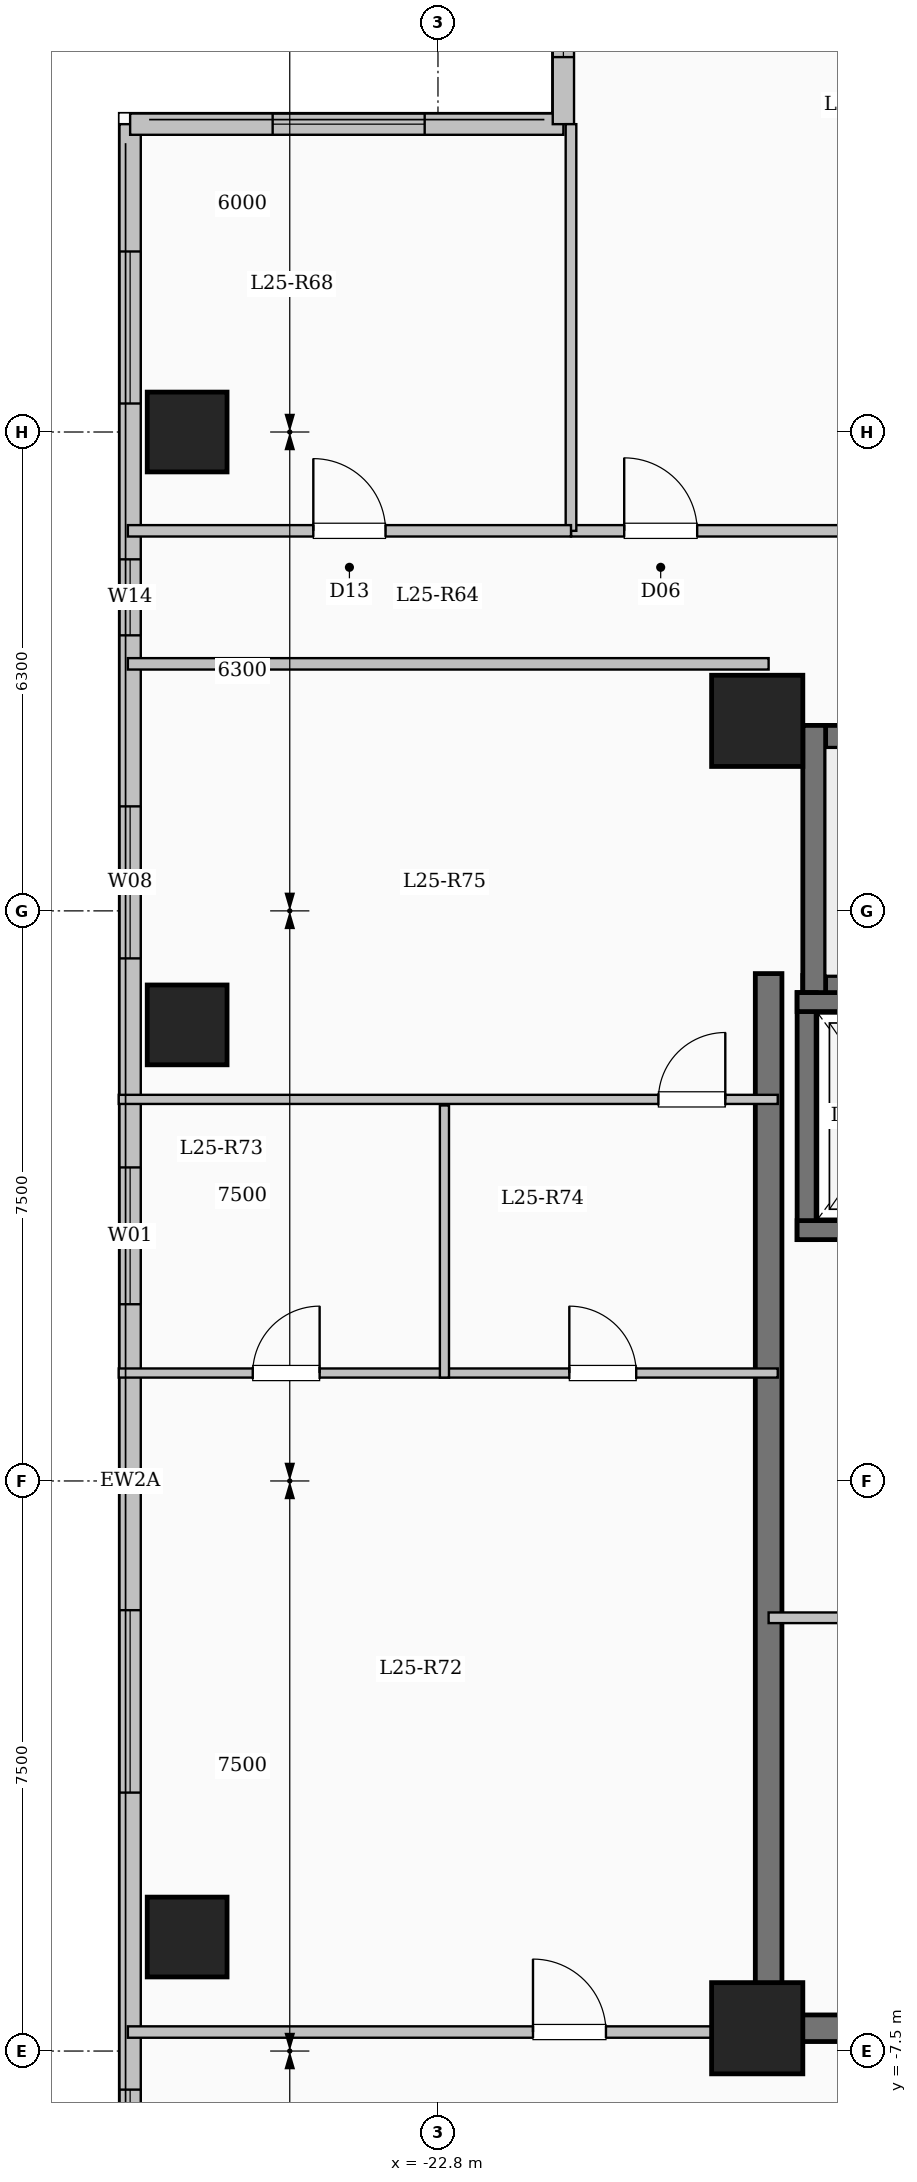
"""IFC4 building model, lengths in metres.
Left out: names, types, materials, properties, quantities, classifications, styles, units other than length and angle.
Written with IfcOpenShell. Run it as: python <this file> out.ifc"""

import sys

from ifc_helpers import new_model, si_unit, direction, frame, frame_2d, origin, origin_2d, place, context, subcontext, project, spatial, rectangle, extrude, element, fill, save


model = new_model("IFC4")
c1 = context("Model", 3, precision=1e-05, world=origin(), true_north=direction((0.0, 1.0)))
c2 = subcontext(c1, "Body", "Model", "MODEL_VIEW")
j1 = project(units=[si_unit("LENGTHUNIT", "METRE"), si_unit("PLANEANGLEUNIT", "RADIAN")], contexts=[c1])
p1 = place(None, origin())
s1 = spatial("IfcSite", under=j1, at=p1, CompositionType="ELEMENT")
p2 = place(p1, origin())
s2 = spatial("IfcBuilding", under=s1, at=p2, CompositionType="ELEMENT")
p3 = place(p2, frame((0.0, 0.0, 95.05)))
s3 = spatial("IfcBuildingStorey", under=s2, at=p3, CompositionType="ELEMENT", Elevation=95.05)
for number, where, z_axis, x_axis in (
    (1, (-18.6, -7.2, 0.0), (0.0, 0.0, 1.0), (1.0, 0.0, 0.0)),
    (2, (-18.6, 10.0, 0.0), (0.0, 0.0, 1.0), (1.0, 0.0, 0.0)),
):
    element("IfcColumn", number, at=place(p3, frame(where, z_axis=z_axis, x_axis=x_axis)), inside=s3, PredefinedType="COLUMN", context=c2, shape_type="SweptSolid", body=[
        extrude(rectangle(XDim=1.2, YDim=1.2, at=origin_2d()), origin(), (0.0, 0.0, 1.0), 3.35),
    ])
for number, where, z_axis, x_axis in (
    (3, (-26.1, -6.0, 0.0), (0.0, 0.0, 1.0), (1.0, 0.0, 0.0)),
    (4, (-26.1, 6.0, 0.0), (0.0, 0.0, 1.0), (1.0, 0.0, 0.0)),
    (5, (-26.1, 13.8, 0.0), (0.0, 0.0, 1.0), (1.0, 0.0, 0.0)),
):
    element("IfcColumn", number, at=place(p3, frame(where, z_axis=z_axis, x_axis=x_axis)), inside=s3, PredefinedType="COLUMN", context=c2, shape_type="SweptSolid", body=[
        extrude(rectangle(XDim=1.05, YDim=1.05, at=origin_2d()), origin(), (0.0, 0.0, 1.0), 3.35),
    ])
p4 = place(p3, frame((-26.85, -17.85, 0.0), z_axis=(0.0, 0.0, 1.0), x_axis=(0.0, 1.0, 0.0)))
e6 = element("IfcWall", 6, at=p4, inside=s3, PredefinedType="SOLIDWALL", context=c2, shape_type="SweptSolid", body=[
    extrude(rectangle(XDim=35.7, YDim=0.28, at=frame_2d((17.85, 0.0))), origin(), (0.0, 0.0, 1.0), 3.1),
])
p5 = place(p4, frame((2.55, 0.0, 0.9)))
e7 = element("IfcOpeningElement", 7, at=p5, cuts=e6, PredefinedType="OPENING", context=c2, shape_type="SweptSolid", body=[
    extrude(rectangle(XDim=2.4, YDim=1.8, at=frame_2d((1.2, 0.9))), frame((0.0, 0.15, 0.0), z_axis=(0.0, -1.0, 0.0), x_axis=(1.0, 0.0, 0.0)), (0.0, 0.0, 1.0), 0.3),
])
p6 = place(p4, frame((8.343, 0.0, 0.9)))
e8 = element("IfcOpeningElement", 8, at=p6, cuts=e6, PredefinedType="OPENING", context=c2, shape_type="SweptSolid", body=[
    extrude(rectangle(XDim=1.5, YDim=1.65, at=frame_2d((0.75, 0.825))), frame((0.0, 0.15, 0.0), z_axis=(0.0, -1.0, 0.0), x_axis=(1.0, 0.0, 0.0)), (0.0, 0.0, 1.0), 0.3),
])
p7 = place(p4, frame((13.75, 0.0, 0.9)))
e9 = element("IfcOpeningElement", 9, at=p7, cuts=e6, PredefinedType="OPENING", context=c2, shape_type="SweptSolid", body=[
    extrude(rectangle(XDim=2.4, YDim=1.8, at=frame_2d((1.2, 0.9))), frame((0.0, 0.15, 0.0), z_axis=(0.0, -1.0, 0.0), x_axis=(1.0, 0.0, 0.0)), (0.0, 0.0, 1.0), 0.3),
])
p8 = place(p4, frame((20.175, 0.0, 0.9)))
e10 = element("IfcOpeningElement", 10, at=p8, cuts=e6, PredefinedType="OPENING", context=c2, shape_type="SweptSolid", body=[
    extrude(rectangle(XDim=1.8, YDim=1.65, at=frame_2d((0.9, 0.825))), frame((0.0, 0.15, 0.0), z_axis=(0.0, -1.0, 0.0), x_axis=(1.0, 0.0, 0.0)), (0.0, 0.0, 1.0), 0.3),
])
p9 = place(p4, frame((24.725, 0.0, 0.9)))
e11 = element("IfcOpeningElement", 11, at=p9, cuts=e6, PredefinedType="OPENING", context=c2, shape_type="SweptSolid", body=[
    extrude(rectangle(XDim=2.0, YDim=1.7, at=frame_2d((1.0, 0.85))), frame((0.0, 0.15, 0.0), z_axis=(0.0, -1.0, 0.0), x_axis=(1.0, 0.0, 0.0)), (0.0, 0.0, 1.0), 0.3),
])
p10 = place(p4, frame((28.975, 0.0, 0.95)))
e12 = element("IfcOpeningElement", 12, at=p10, cuts=e6, PredefinedType="OPENING", context=c2, shape_type="SweptSolid", body=[
    extrude(rectangle(XDim=1.0, YDim=1.5, at=frame_2d((0.5, 0.75))), frame((0.0, 0.15, 0.0), z_axis=(0.0, -1.0, 0.0), x_axis=(1.0, 0.0, 0.0)), (0.0, 0.0, 1.0), 0.3),
])
p11 = place(p4, frame((32.025, 0.0, 0.9)))
e13 = element("IfcOpeningElement", 13, at=p11, cuts=e6, PredefinedType="OPENING", context=c2, shape_type="SweptSolid", body=[
    extrude(rectangle(XDim=2.0, YDim=1.7, at=frame_2d((1.0, 0.85))), frame((0.0, 0.15, 0.0), z_axis=(0.0, -1.0, 0.0), x_axis=(1.0, 0.0, 0.0)), (0.0, 0.0, 1.0), 0.3),
])
p12 = place(p3, frame((-26.85, 17.85, 0.0), z_axis=(0.0, 0.0, 1.0), x_axis=(1.0, 0.0, 0.0)))
e14 = element("IfcWall", 14, at=p12, inside=s3, PredefinedType="SOLIDWALL", context=c2, shape_type="SweptSolid", body=[
    extrude(rectangle(XDim=5.7, YDim=0.28, at=frame_2d((2.85, 0.0))), origin(), (0.0, 0.0, 1.0), 3.1),
])
p13 = place(p12, frame((1.875, 0.0, 0.9)))
e15 = element("IfcOpeningElement", 15, at=p13, cuts=e14, PredefinedType="OPENING", context=c2, shape_type="SweptSolid", body=[
    extrude(rectangle(XDim=2.0, YDim=1.7, at=frame_2d((1.0, 0.85))), frame((0.0, 0.15, 0.0), z_axis=(0.0, -1.0, 0.0), x_axis=(1.0, 0.0, 0.0)), (0.0, 0.0, 1.0), 0.3),
])
p14 = place(p3, frame((-21.15, 17.85, 0.0), z_axis=(0.0, 0.0, 1.0), x_axis=(0.0, 1.0, 0.0)))
e16 = element("IfcWall", 16, at=p14, inside=s3, PredefinedType="SOLIDWALL", context=c2, shape_type="SweptSolid", body=[
    extrude(rectangle(XDim=4.2, YDim=0.28, at=frame_2d((2.1, 0.0))), origin(), (0.0, 0.0, 1.0), 3.1),
])
p15 = place(p14, frame((0.882, 0.0, 0.9)))
e17 = element("IfcOpeningElement", 17, at=p15, cuts=e16, PredefinedType="OPENING", context=c2, shape_type="SweptSolid", body=[
    extrude(rectangle(XDim=2.4, YDim=1.8, at=frame_2d((1.2, 0.9))), frame((0.0, 0.15, 0.0), z_axis=(0.0, -1.0, 0.0), x_axis=(1.0, 0.0, 0.0)), (0.0, 0.0, 1.0), 0.3),
])
p16 = place(p3, frame((-18.0, 9.79, 0.0), z_axis=(0.0, 0.0, 1.0), x_axis=(1.0, 0.0, 0.0)))
e18 = element("IfcWall", 18, at=p16, inside=s3, PredefinedType="SHEAR", context=c2, shape_type="SweptSolid", body=[
    extrude(rectangle(XDim=8.0, YDim=0.3, at=frame_2d((4.0, 0.0))), origin(), (0.0, 0.0, 1.0), 3.35),
])
p17 = place(p3, frame((-18.0, 6.5, 0.0), z_axis=(0.0, 0.0, 1.0), x_axis=(1.0, 0.0, 0.0)))
e19 = element("IfcWall", 19, at=p17, inside=s3, PredefinedType="SHEAR", context=c2, shape_type="SweptSolid", body=[
    extrude(rectangle(XDim=8.0, YDim=0.3, at=frame_2d((4.0, 0.0))), origin(), (0.0, 0.0, 1.0), 3.35),
])
p18 = place(p17, frame((6.45, 0.0, 0.0)))
e20 = element("IfcOpeningElement", 20, at=p18, cuts=e19, PredefinedType="OPENING", context=c2, shape_type="SweptSolid", body=[
    extrude(rectangle(XDim=1.0, YDim=2.15, at=frame_2d((0.5, 1.075))), frame((0.0, 0.16, 0.0), z_axis=(0.0, -1.0, 0.0), x_axis=(1.0, 0.0, 0.0)), (0.0, 0.0, 1.0), 0.32),
])
p19 = place(p3, frame((-17.85, 6.35, 0.0), z_axis=(0.0, 0.0, 1.0), x_axis=(0.0, 1.0, 0.0)))
e21 = element("IfcWall", 21, at=p19, inside=s3, PredefinedType="SHEAR", context=c2, shape_type="SweptSolid", body=[
    extrude(rectangle(XDim=3.59, YDim=0.3, at=frame_2d((1.795, 0.0))), origin(), (0.0, 0.0, 1.0), 3.35),
])
p20 = place(p3, frame((-17.95, 3.175, 0.0), z_axis=(0.0, 0.0, 1.0), x_axis=(0.0, 1.0, 0.0)))
e22 = element("IfcWall", 22, at=p20, inside=s3, PredefinedType="SHEAR", context=c2, shape_type="SweptSolid", body=[
    extrude(rectangle(XDim=3.25, YDim=0.25, at=frame_2d((1.625, 0.0))), origin(), (0.0, 0.0, 1.0), 3.35),
])
for number, where, z_axis, x_axis in (
    (23, (-18.075, 3.3, 0.0), (0.0, 0.0, 1.0), (1.0, 0.0, 0.0)),
    (24, (-18.075, 6.3, 0.0), (0.0, 0.0, 1.0), (1.0, 0.0, 0.0)),
):
    element("IfcWall", number, at=place(p3, frame(where, z_axis=z_axis, x_axis=x_axis)), inside=s3, PredefinedType="SHEAR", context=c2, shape_type="SweptSolid", body=[
        extrude(rectangle(XDim=2.55, YDim=0.25, at=frame_2d((1.275, 0.0))), origin(), (0.0, 0.0, 1.0), 3.35),
    ])
p21 = place(p3, frame((-18.45, -7.375, 0.0), z_axis=(0.0, 0.0, 1.0), x_axis=(0.0, 1.0, 0.0)))
e25 = element("IfcWall", 25, at=p21, inside=s3, PredefinedType="SHEAR", context=c2, shape_type="SweptSolid", body=[
    extrude(rectangle(XDim=14.05, YDim=0.35, at=frame_2d((7.025, 0.0))), origin(), (0.0, 0.0, 1.0), 3.35),
])
p22 = place(p3, frame((-18.625, -7.2, 0.0), z_axis=(0.0, 0.0, 1.0), x_axis=(1.0, 0.0, 0.0)))
e26 = element("IfcWall", 26, at=p22, inside=s3, PredefinedType="SHEAR", context=c2, shape_type="SweptSolid", body=[
    extrude(rectangle(XDim=8.55, YDim=0.35, at=frame_2d((4.275, 0.0))), origin(), (0.0, 0.0, 1.0), 3.35),
])
p23 = place(p3, frame((-18.45, -1.8, 0.0), z_axis=(0.0, 0.0, 1.0), x_axis=(1.0, 0.0, 0.0)))
e27 = element("IfcWall", 27, at=p23, inside=s3, PredefinedType="PARTITIONING", context=c2, shape_type="SweptSolid", body=[
    extrude(rectangle(XDim=3.05, YDim=0.14, at=frame_2d((1.525, 0.0))), origin(), (0.0, 0.0, 1.0), 3.1),
])
p24 = place(p23, frame((1.05, 0.0, 0.0)))
e28 = element("IfcOpeningElement", 28, at=p24, cuts=e27, PredefinedType="OPENING", context=c2, shape_type="SweptSolid", body=[
    extrude(rectangle(XDim=0.9, YDim=2.08, at=frame_2d((0.45, 1.04))), frame((0.0, 0.08, 0.0), z_axis=(0.0, -1.0, 0.0), x_axis=(1.0, 0.0, 0.0)), (0.0, 0.0, 1.0), 0.16),
])
p25 = place(p3, frame((-21.05, 12.5, 0.0), z_axis=(0.0, 0.0, 1.0), x_axis=(1.0, 0.0, 0.0)))
e29 = element("IfcWall", 29, at=p25, inside=s3, PredefinedType="PARTITIONING", context=c2, shape_type="SweptSolid", body=[
    extrude(rectangle(XDim=17.2, YDim=0.15, at=frame_2d((8.6, 0.0))), origin(), (0.0, 0.0, 1.0), 3.1),
])
p26 = place(p25, frame((0.7, 0.0, 0.0)))
e30 = element("IfcOpeningElement", 30, at=p26, cuts=e29, PredefinedType="OPENING", context=c2, shape_type="SweptSolid", body=[
    extrude(rectangle(XDim=0.96, YDim=2.15, at=frame_2d((0.48, 1.075))), frame((0.0, 0.085, 0.0), z_axis=(0.0, -1.0, 0.0), x_axis=(1.0, 0.0, 0.0)), (0.0, 0.0, 1.0), 0.17),
])
p27 = place(p3, frame((-26.88, -7.25, 0.0), z_axis=(0.0, 0.0, 1.0), x_axis=(1.0, 0.0, 0.0)))
e31 = element("IfcWall", 31, at=p27, inside=s3, PredefinedType="PARTITIONING", context=c2, shape_type="SweptSolid", body=[
    extrude(rectangle(XDim=8.43, YDim=0.15, at=frame_2d((4.215, 0.0))), origin(), (0.0, 0.0, 1.0), 3.1),
])
p28 = place(p27, frame((5.33, 0.0, 0.0)))
e32 = element("IfcOpeningElement", 32, at=p28, cuts=e31, PredefinedType="OPENING", context=c2, shape_type="SweptSolid", body=[
    extrude(rectangle(XDim=0.96, YDim=2.15, at=frame_2d((0.48, 1.075))), frame((0.0, 0.085, 0.0), z_axis=(0.0, -1.0, 0.0), x_axis=(1.0, 0.0, 0.0)), (0.0, 0.0, 1.0), 0.17),
])
p29 = place(p3, frame((-26.88, 10.75, 0.0), z_axis=(0.0, 0.0, 1.0), x_axis=(1.0, 0.0, 0.0)))
e33 = element("IfcWall", 33, at=p29, inside=s3, PredefinedType="PARTITIONING", context=c2, shape_type="SweptSolid", body=[
    extrude(rectangle(XDim=8.43, YDim=0.15, at=frame_2d((4.215, 0.0))), origin(), (0.0, 0.0, 1.0), 3.1),
])
p30 = place(p3, frame((-21.05, 12.5, 0.0), z_axis=(0.0, 0.0, 1.0), x_axis=(0.0, 1.0, 0.0)))
e34 = element("IfcWall", 34, at=p30, inside=s3, PredefinedType="PARTITIONING", context=c2, shape_type="SweptSolid", body=[
    extrude(rectangle(XDim=5.35, YDim=0.14, at=frame_2d((2.675, 0.0))), origin(), (0.0, 0.0, 1.0), 3.1),
])
p31 = place(p3, frame((-26.88, 12.5, 0.0), z_axis=(0.0, 0.0, 1.0), x_axis=(1.0, 0.0, 0.0)))
e35 = element("IfcWall", 35, at=p31, inside=s3, PredefinedType="PARTITIONING", context=c2, shape_type="SweptSolid", body=[
    extrude(rectangle(XDim=5.83, YDim=0.15, at=frame_2d((2.915, 0.0))), origin(), (0.0, 0.0, 1.0), 3.1),
])
p32 = place(p31, frame((2.44, 0.0, 0.0)))
e36 = element("IfcOpeningElement", 36, at=p32, cuts=e35, PredefinedType="OPENING", context=c2, shape_type="SweptSolid", body=[
    extrude(rectangle(XDim=0.95, YDim=2.15, at=frame_2d((0.475, 1.075))), frame((0.0, 0.085, 0.0), z_axis=(0.0, -1.0, 0.0), x_axis=(1.0, 0.0, 0.0)), (0.0, 0.0, 1.0), 0.17),
])
p33 = place(p3, frame((-27.0, 1.42, 0.0), z_axis=(0.0, 0.0, 1.0), x_axis=(1.0, 0.0, 0.0)))
e37 = element("IfcWall", 37, at=p33, inside=s3, PredefinedType="PARTITIONING", context=c2, shape_type="SweptSolid", body=[
    extrude(rectangle(XDim=8.67, YDim=0.12, at=frame_2d((4.335, 0.0))), origin(), (0.0, 0.0, 1.0), 3.1),
])
p34 = place(p33, frame((1.763, 0.0, 0.0)))
e38 = element("IfcOpeningElement", 38, at=p34, cuts=e37, PredefinedType="OPENING", context=c2, shape_type="SweptSolid", body=[
    extrude(rectangle(XDim=0.88, YDim=2.1, at=frame_2d((0.44, 1.05))), frame((0.0, 0.07, 0.0), z_axis=(0.0, -1.0, 0.0), x_axis=(1.0, 0.0, 0.0)), (0.0, 0.0, 1.0), 0.14),
])
p35 = place(p33, frame((5.928, 0.0, 0.0)))
e39 = element("IfcOpeningElement", 39, at=p35, cuts=e37, PredefinedType="OPENING", context=c2, shape_type="SweptSolid", body=[
    extrude(rectangle(XDim=0.88, YDim=2.1, at=frame_2d((0.44, 1.05))), frame((0.0, 0.07, 0.0), z_axis=(0.0, -1.0, 0.0), x_axis=(1.0, 0.0, 0.0)), (0.0, 0.0, 1.0), 0.14),
])
p36 = place(p3, frame((-27.0, 5.02, 0.0), z_axis=(0.0, 0.0, 1.0), x_axis=(1.0, 0.0, 0.0)))
e40 = element("IfcWall", 40, at=p36, inside=s3, PredefinedType="PARTITIONING", context=c2, shape_type="SweptSolid", body=[
    extrude(rectangle(XDim=8.67, YDim=0.12, at=frame_2d((4.335, 0.0))), origin(), (0.0, 0.0, 1.0), 3.1),
])
p37 = place(p36, frame((7.1, 0.0, 0.0)))
e41 = element("IfcOpeningElement", 41, at=p37, cuts=e40, PredefinedType="OPENING", context=c2, shape_type="SweptSolid", body=[
    extrude(rectangle(XDim=0.88, YDim=2.1, at=frame_2d((0.44, 1.05))), frame((0.0, 0.07, 0.0), z_axis=(0.0, -1.0, 0.0), x_axis=(1.0, 0.0, 0.0)), (0.0, 0.0, 1.0), 0.14),
])
p38 = place(p3, frame((-22.715, 1.36, 0.0), z_axis=(0.0, 0.0, 1.0), x_axis=(0.0, 1.0, 0.0)))
e42 = element("IfcWall", 42, at=p38, inside=s3, PredefinedType="PARTITIONING", context=c2, shape_type="SweptSolid", body=[
    extrude(rectangle(XDim=3.58, YDim=0.12, at=frame_2d((1.79, 0.0))), origin(), (0.0, 0.0, 1.0), 3.1),
])
p39 = place(p6, origin())
e43 = element("IfcWindow", 43, at=p39, inside=s3, PartitioningType="SINGLE_PANEL", PredefinedType="WINDOW", context=c2, shape_type="SweptSolid", body=[
    extrude(rectangle(XDim=1.5, YDim=1.65, at=frame_2d((0.75, 0.825))), frame((0.0, 0.03, 0.0), z_axis=(0.0, -1.0, 0.0), x_axis=(1.0, 0.0, 0.0)), (0.0, 0.0, 1.0), 0.06),
])
fill(e8, e43)
p40 = place(p7, origin())
e44 = element("IfcWindow", 44, at=p40, inside=s3, PartitioningType="SINGLE_PANEL", PredefinedType="WINDOW", context=c2, shape_type="SweptSolid", body=[
    extrude(rectangle(XDim=2.4, YDim=1.8, at=frame_2d((1.2, 0.9))), frame((0.0, 0.03, 0.0), z_axis=(0.0, -1.0, 0.0), x_axis=(1.0, 0.0, 0.0)), (0.0, 0.0, 1.0), 0.06),
])
fill(e9, e44)
p41 = place(p8, origin())
e45 = element("IfcWindow", 45, at=p41, inside=s3, PartitioningType="SINGLE_PANEL", PredefinedType="WINDOW", context=c2, shape_type="SweptSolid", body=[
    extrude(rectangle(XDim=1.8, YDim=1.65, at=frame_2d((0.9, 0.825))), frame((0.0, 0.03, 0.0), z_axis=(0.0, -1.0, 0.0), x_axis=(1.0, 0.0, 0.0)), (0.0, 0.0, 1.0), 0.06),
])
fill(e10, e45)
p42 = place(p9, origin())
e46 = element("IfcWindow", 46, at=p42, inside=s3, PartitioningType="SINGLE_PANEL", PredefinedType="WINDOW", context=c2, shape_type="SweptSolid", body=[
    extrude(rectangle(XDim=2.0, YDim=1.7, at=frame_2d((1.0, 0.85))), frame((0.0, 0.03, 0.0), z_axis=(0.0, -1.0, 0.0), x_axis=(1.0, 0.0, 0.0)), (0.0, 0.0, 1.0), 0.06),
])
fill(e11, e46)
p43 = place(p10, origin())
e47 = element("IfcWindow", 47, at=p43, inside=s3, PartitioningType="SINGLE_PANEL", PredefinedType="WINDOW", context=c2, shape_type="SweptSolid", body=[
    extrude(rectangle(XDim=1.0, YDim=1.5, at=frame_2d((0.5, 0.75))), frame((0.0, 0.03, 0.0), z_axis=(0.0, -1.0, 0.0), x_axis=(1.0, 0.0, 0.0)), (0.0, 0.0, 1.0), 0.06),
])
fill(e12, e47)
p44 = place(p11, origin())
e48 = element("IfcWindow", 48, at=p44, inside=s3, PartitioningType="SINGLE_PANEL", PredefinedType="WINDOW", context=c2, shape_type="SweptSolid", body=[
    extrude(rectangle(XDim=2.0, YDim=1.7, at=frame_2d((1.0, 0.85))), frame((0.0, 0.03, 0.0), z_axis=(0.0, -1.0, 0.0), x_axis=(1.0, 0.0, 0.0)), (0.0, 0.0, 1.0), 0.06),
])
fill(e13, e48)
p45 = place(p13, origin())
e49 = element("IfcWindow", 49, at=p45, inside=s3, PartitioningType="SINGLE_PANEL", PredefinedType="WINDOW", context=c2, shape_type="SweptSolid", body=[
    extrude(rectangle(XDim=2.0, YDim=1.7, at=frame_2d((1.0, 0.85))), frame((0.0, 0.03, 0.0), z_axis=(0.0, -1.0, 0.0), x_axis=(1.0, 0.0, 0.0)), (0.0, 0.0, 1.0), 0.06),
])
fill(e15, e49)
p46 = place(p15, origin())
e50 = element("IfcWindow", 50, at=p46, inside=s3, PartitioningType="SINGLE_PANEL", PredefinedType="WINDOW", context=c2, shape_type="SweptSolid", body=[
    extrude(rectangle(XDim=2.4, YDim=1.8, at=frame_2d((1.2, 0.9))), frame((0.0, 0.03, 0.0), z_axis=(0.0, -1.0, 0.0), x_axis=(1.0, 0.0, 0.0)), (0.0, 0.0, 1.0), 0.06),
])
fill(e17, e50)
p47 = place(p26, origin())
e51 = element("IfcDoor", 51, at=p47, inside=s3, OperationType="SINGLE_SWING_LEFT", PredefinedType="DOOR", context=c2, shape_type="SweptSolid", body=[
    extrude(rectangle(XDim=0.96, YDim=2.15, at=frame_2d((0.48, 1.075))), frame((0.0, 0.025, 0.0), z_axis=(0.0, -1.0, 0.0), x_axis=(1.0, 0.0, 0.0)), (0.0, 0.0, 1.0), 0.05),
])
fill(e30, e51)
p48 = place(p32, origin())
e52 = element("IfcDoor", 52, at=p48, inside=s3, OperationType="SINGLE_SWING_LEFT", PredefinedType="DOOR", context=c2, shape_type="SweptSolid", body=[
    extrude(rectangle(XDim=0.95, YDim=2.15, at=frame_2d((0.475, 1.075))), frame((0.0, 0.025, 0.0), z_axis=(0.0, -1.0, 0.0), x_axis=(1.0, 0.0, 0.0)), (0.0, 0.0, 1.0), 0.05),
])
fill(e36, e52)
p49 = place(p28, origin())
e53 = element("IfcDoor", 53, at=p49, inside=s3, OperationType="SINGLE_SWING_LEFT", PredefinedType="DOOR", context=c2, shape_type="SweptSolid", body=[
    extrude(rectangle(XDim=0.96, YDim=2.15, at=frame_2d((0.48, 1.075))), frame((0.0, 0.025, 0.0), z_axis=(0.0, -1.0, 0.0), x_axis=(1.0, 0.0, 0.0)), (0.0, 0.0, 1.0), 0.05),
])
fill(e32, e53)
p50 = place(p34, origin())
e54 = element("IfcDoor", 54, at=p50, inside=s3, OperationType="SINGLE_SWING_RIGHT", PredefinedType="DOOR", context=c2, shape_type="SweptSolid", body=[
    extrude(rectangle(XDim=0.88, YDim=2.1, at=frame_2d((0.44, 1.05))), frame((0.0, 0.025, 0.0), z_axis=(0.0, -1.0, 0.0), x_axis=(1.0, 0.0, 0.0)), (0.0, 0.0, 1.0), 0.05),
])
fill(e38, e54)
p51 = place(p35, origin())
e55 = element("IfcDoor", 55, at=p51, inside=s3, OperationType="SINGLE_SWING_LEFT", PredefinedType="DOOR", context=c2, shape_type="SweptSolid", body=[
    extrude(rectangle(XDim=0.88, YDim=2.1, at=frame_2d((0.44, 1.05))), frame((0.0, 0.025, 0.0), z_axis=(0.0, -1.0, 0.0), x_axis=(1.0, 0.0, 0.0)), (0.0, 0.0, 1.0), 0.05),
])
fill(e39, e55)
p52 = place(p37, origin())
e56 = element("IfcDoor", 56, at=p52, inside=s3, OperationType="SINGLE_SWING_RIGHT", PredefinedType="DOOR", context=c2, shape_type="SweptSolid", body=[
    extrude(rectangle(XDim=0.88, YDim=2.1, at=frame_2d((0.44, 1.05))), frame((0.0, 0.025, 0.0), z_axis=(0.0, -1.0, 0.0), x_axis=(1.0, 0.0, 0.0)), (0.0, 0.0, 1.0), 0.05),
])
fill(e41, e56)
save(model, sys.argv[1])
